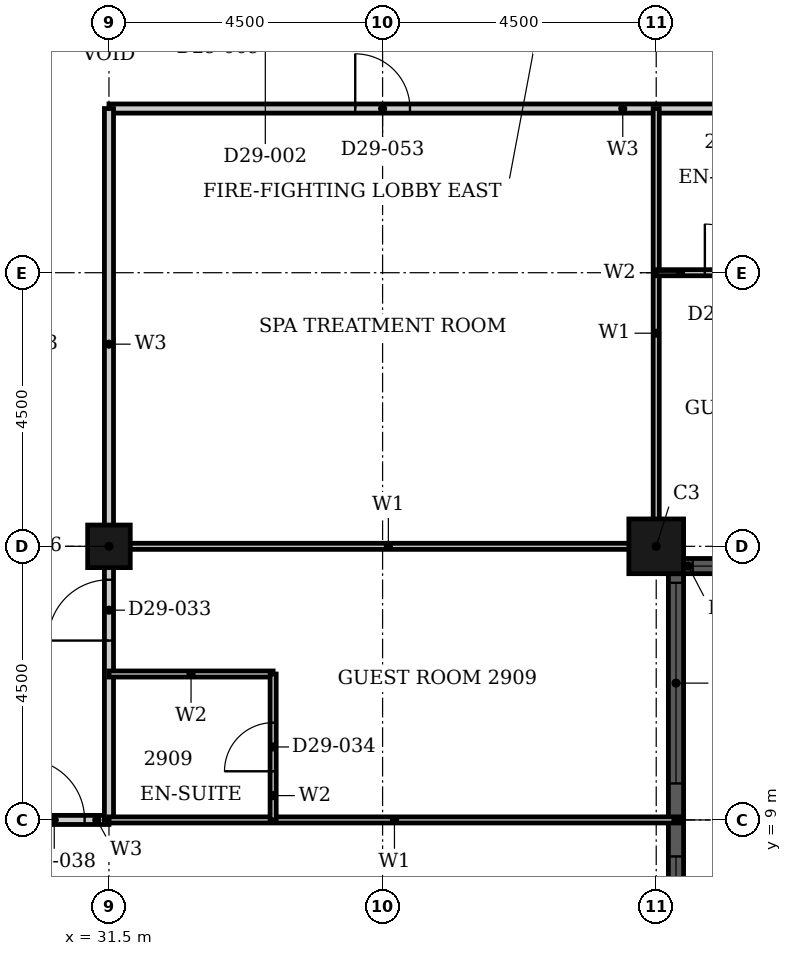
"""IFC4 building model, lengths in metres.
Left out: names, types, materials, properties, quantities, classifications, styles, units other than length and angle.
Written with IfcOpenShell. Run it as: python <this file> out.ifc"""

import sys

from ifc_helpers import new_model, si_unit, direction, frame, frame_2d, origin, origin_2d, place, context, subcontext, project, spatial, rectangle, hollow_rectangle, extrude, element, fill, save


model = new_model("IFC4")
c1 = context("Model", 3, precision=1e-05, world=origin(), true_north=direction((0.0, 1.0)))
c2 = subcontext(c1, "Body", "Model", "MODEL_VIEW")
j1 = project(units=[si_unit("LENGTHUNIT", "METRE"), si_unit("PLANEANGLEUNIT", "RADIAN")], contexts=[c1])
p1 = place(None, origin())
s1 = spatial("IfcSite", under=j1, at=p1, CompositionType="ELEMENT")
p2 = place(p1, origin())
s2 = spatial("IfcBuilding", under=s1, at=p2, CompositionType="ELEMENT")
p3 = place(p2, frame((0.0, 0.0, 118.8)))
s3 = spatial("IfcBuildingStorey", under=s2, at=p3, CompositionType="ELEMENT", Elevation=118.8)
p4 = place(p3, frame((40.5, 13.5, 0.0), z_axis=(0.0, 0.0, 1.0), x_axis=(1.0, 0.0, 0.0)))
e1 = element("IfcColumn", 1, at=p4, inside=s3, PredefinedType="COLUMN", context=c2, shape_type="SweptSolid", body=[
    extrude(hollow_rectangle(XDim=0.9, YDim=0.9, WallThickness=0.028, at=origin_2d()), origin(), (0.0, 0.0, 1.0), 3.6),
])
p5 = place(p3, frame((31.5, 13.5, 0.0), z_axis=(0.0, 0.0, 1.0), x_axis=(1.0, 0.0, 0.0)))
e2 = element("IfcColumn", 2, at=p5, inside=s3, PredefinedType="COLUMN", context=c2, shape_type="SweptSolid", body=[
    extrude(hollow_rectangle(XDim=0.7, YDim=0.7, WallThickness=0.022, at=origin_2d()), origin(), (0.0, 0.0, 1.0), 3.6),
])
p6 = place(p3, frame((40.825, 4.95, 0.0), z_axis=(0.0, 0.0, 1.0), x_axis=(0.0, 1.0, 0.0)))
e3 = element("IfcWall", 3, at=p6, inside=s3, PredefinedType="SOLIDWALL", context=c2, shape_type="SweptSolid", body=[
    extrude(rectangle(XDim=8.1, YDim=0.25, at=frame_2d((4.05, 0.0))), origin(), (0.0, 0.0, 1.0), 3.6),
])
p7 = place(p6, frame((0.15, 0.0, 0.9)))
e4 = element("IfcOpeningElement", 4, at=p7, cuts=e3, PredefinedType="OPENING", context=c2, shape_type="SweptSolid", body=[
    extrude(rectangle(XDim=3.3, YDim=2.08, at=frame_2d((1.65, 1.04))), frame((0.0, 0.135, 0.0), z_axis=(0.0, -1.0, 0.0), x_axis=(1.0, 0.0, 0.0)), (0.0, 0.0, 1.0), 0.27),
])
p8 = place(p6, frame((4.65, 0.0, 0.9)))
e5 = element("IfcOpeningElement", 5, at=p8, cuts=e3, PredefinedType="OPENING", context=c2, shape_type="SweptSolid", body=[
    extrude(rectangle(XDim=3.3, YDim=2.08, at=frame_2d((1.65, 1.04))), frame((0.0, 0.135, 0.0), z_axis=(0.0, -1.0, 0.0), x_axis=(1.0, 0.0, 0.0)), (0.0, 0.0, 1.0), 0.27),
])
p9 = place(p3, frame((40.95, 13.175, 0.0), z_axis=(0.0, 0.0, 1.0), x_axis=(1.0, 0.0, 0.0)))
e6 = element("IfcWall", 6, at=p9, inside=s3, PredefinedType="SOLIDWALL", context=c2, shape_type="SweptSolid", body=[
    extrude(rectangle(XDim=3.6, YDim=0.25, at=frame_2d((1.8, 0.0))), origin(), (0.0, 0.0, 1.0), 3.6),
])
p10 = place(p9, frame((0.15, 0.0, 0.9)))
e7 = element("IfcOpeningElement", 7, at=p10, cuts=e6, PredefinedType="OPENING", context=c2, shape_type="SweptSolid", body=[
    extrude(rectangle(XDim=3.3, YDim=2.08, at=frame_2d((1.65, 1.04))), frame((0.0, 0.135, 0.0), z_axis=(0.0, -1.0, 0.0), x_axis=(1.0, 0.0, 0.0)), (0.0, 0.0, 1.0), 0.27),
])
p11 = place(p3, frame((31.5, 20.7, 0.0), z_axis=(0.0, 0.0, 1.0), x_axis=(1.0, 0.0, 0.0)))
e8 = element("IfcWall", 8, at=p11, inside=s3, PredefinedType="PARTITIONING", context=c2, shape_type="SweptSolid", body=[
    extrude(rectangle(XDim=15.3, YDim=0.15, at=frame_2d((7.65, 0.0))), origin(), (0.0, 0.0, 1.0), 3.3),
])
p12 = place(p11, frame((11.95, 0.0, 0.0)))
e9 = element("IfcOpeningElement", 9, at=p12, cuts=e8, PredefinedType="OPENING", context=c2, shape_type="SweptSolid", body=[
    extrude(rectangle(XDim=1.0, YDim=2.1, at=frame_2d((0.5, 1.05))), frame((0.0, 0.085, 0.0), z_axis=(0.0, -1.0, 0.0), x_axis=(1.0, 0.0, 0.0)), (0.0, 0.0, 1.0), 0.17),
])
p13 = place(p11, frame((13.95, 0.0, 0.0)))
e10 = element("IfcOpeningElement", 10, at=p13, cuts=e8, PredefinedType="OPENING", context=c2, shape_type="SweptSolid", body=[
    extrude(rectangle(XDim=0.9, YDim=2.1, at=frame_2d((0.45, 1.05))), frame((0.0, 0.085, 0.0), z_axis=(0.0, -1.0, 0.0), x_axis=(1.0, 0.0, 0.0)), (0.0, 0.0, 1.0), 0.17),
])
p14 = place(p11, frame((4.05, 0.0, 0.0)))
e11 = element("IfcOpeningElement", 11, at=p14, cuts=e8, PredefinedType="OPENING", context=c2, shape_type="SweptSolid", body=[
    extrude(rectangle(XDim=0.9, YDim=2.1, at=frame_2d((0.45, 1.05))), frame((0.0, 0.085, 0.0), z_axis=(0.0, -1.0, 0.0), x_axis=(1.0, 0.0, 0.0)), (0.0, 0.0, 1.0), 0.17),
])
p15 = place(p3, frame((29.7, 9.0, 0.0), z_axis=(0.0, 0.0, 1.0), x_axis=(1.0, 0.0, 0.0)))
e12 = element("IfcWall", 12, at=p15, inside=s3, PredefinedType="PARTITIONING", context=c2, shape_type="SweptSolid", body=[
    extrude(rectangle(XDim=1.8, YDim=0.15, at=frame_2d((0.9, 0.0))), origin(), (0.0, 0.0, 1.0), 3.3),
])
p16 = place(p15, frame((0.4, 0.0, 0.0)))
e13 = element("IfcOpeningElement", 13, at=p16, cuts=e12, PredefinedType="OPENING", context=c2, shape_type="SweptSolid", body=[
    extrude(rectangle(XDim=1.0, YDim=2.1, at=frame_2d((0.5, 1.05))), frame((0.0, 0.085, 0.0), z_axis=(0.0, -1.0, 0.0), x_axis=(1.0, 0.0, 0.0)), (0.0, 0.0, 1.0), 0.17),
])
p17 = place(p3, frame((31.5, 9.0, 0.0), z_axis=(0.0, 0.0, 1.0), x_axis=(0.0, 1.0, 0.0)))
e14 = element("IfcWall", 14, at=p17, inside=s3, PredefinedType="PARTITIONING", context=c2, shape_type="SweptSolid", body=[
    extrude(rectangle(XDim=11.7, YDim=0.15, at=frame_2d((5.85, 0.0))), origin(), (0.0, 0.0, 1.0), 2.58),
])
p18 = place(p17, frame((2.95, 0.0, 0.0)))
e15 = element("IfcOpeningElement", 15, at=p18, cuts=e14, PredefinedType="OPENING", context=c2, shape_type="SweptSolid", body=[
    extrude(rectangle(XDim=1.0, YDim=2.1, at=frame_2d((0.5, 1.05))), frame((0.0, 0.085, 0.0), z_axis=(0.0, -1.0, 0.0), x_axis=(1.0, 0.0, 0.0)), (0.0, 0.0, 1.0), 0.17),
])
p19 = place(p3, frame((31.5, 13.5, 0.0), z_axis=(0.0, 0.0, 1.0), x_axis=(1.0, 0.0, 0.0)))
e16 = element("IfcWall", 16, at=p19, inside=s3, PredefinedType="PARTITIONING", context=c2, shape_type="SweptSolid", body=[
    extrude(rectangle(XDim=9.19, YDim=0.1, at=frame_2d((4.595, 0.0))), origin(), (0.0, 0.0, 1.0), 2.38),
])
p20 = place(p3, frame((31.5, 9.0, 0.0), z_axis=(0.0, 0.0, 1.0), x_axis=(1.0, 0.0, 0.0)))
e17 = element("IfcWall", 17, at=p20, inside=s3, PredefinedType="PARTITIONING", context=c2, shape_type="SweptSolid", body=[
    extrude(rectangle(XDim=9.39, YDim=0.1, at=frame_2d((4.695, 0.0))), origin(), (0.0, 0.0, 1.0), 3.3),
])
p21 = place(p3, frame((40.5, 13.31, 0.0), z_axis=(0.0, 0.0, 1.0), x_axis=(0.0, 1.0, 0.0)))
e18 = element("IfcWall", 18, at=p21, inside=s3, PredefinedType="PARTITIONING", context=c2, shape_type="SweptSolid", body=[
    extrude(rectangle(XDim=7.39, YDim=0.1, at=frame_2d((3.695, 0.0))), origin(), (0.0, 0.0, 1.0), 3.3),
])
p22 = place(p3, frame((31.5, 11.4, 0.0), z_axis=(0.0, 0.0, 1.0), x_axis=(1.0, 0.0, 0.0)))
e19 = element("IfcWall", 19, at=p22, inside=s3, PredefinedType="PARTITIONING", context=c2, shape_type="SweptSolid", body=[
    extrude(rectangle(XDim=2.7, YDim=0.1, at=frame_2d((1.35, 0.0))), origin(), (0.0, 0.0, 1.0), 3.3),
])
p23 = place(p3, frame((40.5, 18.0, 0.0), z_axis=(0.0, 0.0, 1.0), x_axis=(1.0, 0.0, 0.0)))
e20 = element("IfcWall", 20, at=p23, inside=s3, PredefinedType="PARTITIONING", context=c2, shape_type="SweptSolid", body=[
    extrude(rectangle(XDim=2.4, YDim=0.1, at=frame_2d((1.2, 0.0))), origin(), (0.0, 0.0, 1.0), 3.3),
])
p24 = place(p23, frame((0.8, 0.0, 0.0)))
e21 = element("IfcOpeningElement", 21, at=p24, cuts=e20, PredefinedType="OPENING", context=c2, shape_type="SweptSolid", body=[
    extrude(rectangle(XDim=0.8, YDim=2.1, at=frame_2d((0.4, 1.05))), frame((0.0, 0.06, 0.0), z_axis=(0.0, -1.0, 0.0), x_axis=(1.0, 0.0, 0.0)), (0.0, 0.0, 1.0), 0.12),
])
p25 = place(p3, frame((34.2, 9.0, 0.0), z_axis=(0.0, 0.0, 1.0), x_axis=(0.0, 1.0, 0.0)))
e22 = element("IfcWall", 22, at=p25, inside=s3, PredefinedType="PARTITIONING", context=c2, shape_type="SweptSolid", body=[
    extrude(rectangle(XDim=2.4, YDim=0.1, at=frame_2d((1.2, 0.0))), origin(), (0.0, 0.0, 1.0), 3.3),
])
p26 = place(p25, frame((0.8, 0.0, 0.0)))
e23 = element("IfcOpeningElement", 23, at=p26, cuts=e22, PredefinedType="OPENING", context=c2, shape_type="SweptSolid", body=[
    extrude(rectangle(XDim=0.8, YDim=2.1, at=frame_2d((0.4, 1.05))), frame((0.0, 0.06, 0.0), z_axis=(0.0, -1.0, 0.0), x_axis=(1.0, 0.0, 0.0)), (0.0, 0.0, 1.0), 0.12),
])
p27 = place(p7, origin())
e24 = element("IfcWindow", 24, at=p27, inside=s3, PartitioningType="SINGLE_PANEL", PredefinedType="WINDOW", context=c2, shape_type="SweptSolid", body=[
    extrude(rectangle(XDim=3.3, YDim=2.08, at=frame_2d((1.65, 1.04))), frame((0.0, 0.03, 0.0), z_axis=(0.0, -1.0, 0.0), x_axis=(1.0, 0.0, 0.0)), (0.0, 0.0, 1.0), 0.06),
])
fill(e4, e24)
p28 = place(p8, origin())
e25 = element("IfcWindow", 25, at=p28, inside=s3, PartitioningType="SINGLE_PANEL", PredefinedType="WINDOW", context=c2, shape_type="SweptSolid", body=[
    extrude(rectangle(XDim=3.3, YDim=2.08, at=frame_2d((1.65, 1.04))), frame((0.0, 0.03, 0.0), z_axis=(0.0, -1.0, 0.0), x_axis=(1.0, 0.0, 0.0)), (0.0, 0.0, 1.0), 0.06),
])
fill(e5, e25)
p29 = place(p10, origin())
e26 = element("IfcWindow", 26, at=p29, inside=s3, PartitioningType="SINGLE_PANEL", PredefinedType="WINDOW", context=c2, shape_type="SweptSolid", body=[
    extrude(rectangle(XDim=3.3, YDim=2.08, at=frame_2d((1.65, 1.04))), frame((0.0, 0.03, 0.0), z_axis=(0.0, -1.0, 0.0), x_axis=(1.0, 0.0, 0.0)), (0.0, 0.0, 1.0), 0.06),
])
fill(e7, e26)
p30 = place(p18, origin())
e27 = element("IfcDoor", 27, at=p30, inside=s3, OperationType="SINGLE_SWING_RIGHT", PredefinedType="DOOR", context=c2, shape_type="SweptSolid", body=[
    extrude(rectangle(XDim=1.0, YDim=2.1, at=frame_2d((0.5, 1.05))), frame((0.0, 0.025, 0.0), z_axis=(0.0, -1.0, 0.0), x_axis=(1.0, 0.0, 0.0)), (0.0, 0.0, 1.0), 0.05),
])
fill(e15, e27)
p31 = place(p26, origin())
e28 = element("IfcDoor", 28, at=p31, inside=s3, OperationType="SINGLE_SWING_RIGHT", PredefinedType="DOOR", context=c2, shape_type="SweptSolid", body=[
    extrude(rectangle(XDim=0.8, YDim=2.1, at=frame_2d((0.4, 1.05))), frame((0.0, 0.025, 0.0), z_axis=(0.0, -1.0, 0.0), x_axis=(1.0, 0.0, 0.0)), (0.0, 0.0, 1.0), 0.05),
])
fill(e23, e28)
p32 = place(p16, origin())
e29 = element("IfcDoor", 29, at=p32, inside=s3, OperationType="SINGLE_SWING_RIGHT", PredefinedType="DOOR", context=c2, shape_type="SweptSolid", body=[
    extrude(rectangle(XDim=1.0, YDim=2.1, at=frame_2d((0.5, 1.05))), frame((0.0, 0.025, 0.0), z_axis=(0.0, -1.0, 0.0), x_axis=(1.0, 0.0, 0.0)), (0.0, 0.0, 1.0), 0.05),
])
fill(e13, e29)
p33 = place(p24, origin())
e30 = element("IfcDoor", 30, at=p33, inside=s3, OperationType="SINGLE_SWING_LEFT", PredefinedType="DOOR", context=c2, shape_type="SweptSolid", body=[
    extrude(rectangle(XDim=0.8, YDim=2.1, at=frame_2d((0.4, 1.05))), frame((0.0, 0.025, 0.0), z_axis=(0.0, -1.0, 0.0), x_axis=(1.0, 0.0, 0.0)), (0.0, 0.0, 1.0), 0.05),
])
fill(e21, e30)
p34 = place(p14, origin())
e31 = element("IfcDoor", 31, at=p34, inside=s3, OperationType="SINGLE_SWING_RIGHT", PredefinedType="DOOR", context=c2, shape_type="SweptSolid", body=[
    extrude(rectangle(XDim=0.9, YDim=2.1, at=frame_2d((0.45, 1.05))), frame((0.0, 0.025, 0.0), z_axis=(0.0, -1.0, 0.0), x_axis=(1.0, 0.0, 0.0)), (0.0, 0.0, 1.0), 0.05),
])
fill(e11, e31)
save(model, sys.argv[1])
